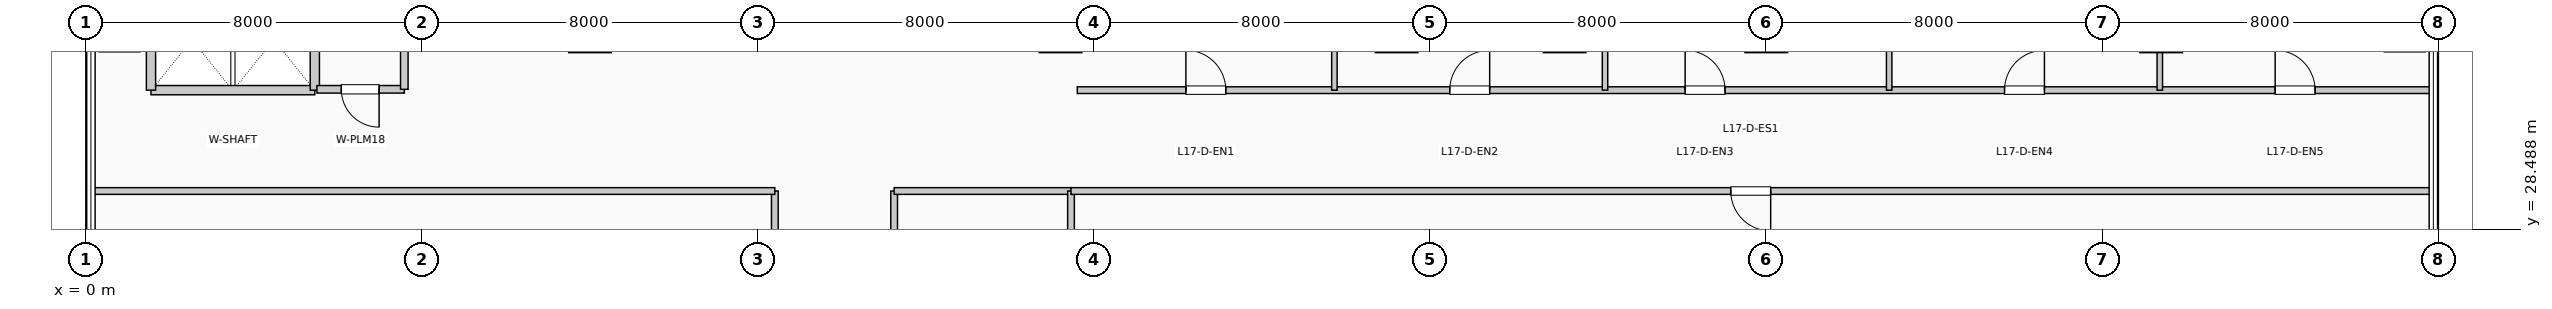
"""IFC4 building model, lengths in metres.
Left out: names, types, materials, properties, quantities, classifications, styles, units other than length and angle.
Written with IfcOpenShell. Run it as: python <this file> out.ifc"""

import sys

from ifc_helpers import new_model, si_unit, direction, frame, frame_2d, origin, place, context, subcontext, project, spatial, rectangle, extrude, element, fill, save


model = new_model("IFC4")
c1 = context("Model", 3, precision=1e-05, world=origin(), true_north=direction((0.0, 1.0)))
c2 = subcontext(c1, "Body", "Model", "MODEL_VIEW")
j1 = project(units=[si_unit("LENGTHUNIT", "METRE"), si_unit("PLANEANGLEUNIT", "RADIAN")], contexts=[c1])
p1 = place(None, origin())
s1 = spatial("IfcSite", under=j1, at=p1, CompositionType="ELEMENT")
p2 = place(p1, origin())
s2 = spatial("IfcBuilding", under=s1, at=p2, CompositionType="ELEMENT")
p3 = place(p2, frame((0.0, 0.0, 73.92)))
s3 = spatial("IfcBuildingStorey", under=s2, at=p3, CompositionType="ELEMENT", Elevation=73.92)
p4 = place(p3, frame((1.55, 31.8, 0.0), z_axis=(0.0, 0.0, 1.0), x_axis=(1.0, 0.0, 0.0)))
e1 = element("IfcWall", 1, at=p4, inside=s3, PredefinedType="PARTITIONING", context=c2, shape_type="SweptSolid", body=[
    extrude(rectangle(XDim=3.9, YDim=0.22, at=frame_2d((1.95, 0.0))), origin(), (0.0, 0.0, 1.0), 3.71),
])
for number, where, z_axis, x_axis in (
    (2, (1.55, 31.8, 0.0), (0.0, 0.0, 1.0), (0.0, 1.0, 0.0)),
    (3, (5.45, 31.8, 0.0), (0.0, 0.0, 1.0), (0.0, 1.0, 0.0)),
):
    element("IfcWall", number, at=place(p3, frame(where, z_axis=z_axis, x_axis=x_axis)), inside=s3, PredefinedType="PARTITIONING", context=c2, shape_type="SweptSolid", body=[
        extrude(rectangle(XDim=2.38, YDim=0.22, at=frame_2d((1.19, 0.0))), origin(), (0.0, 0.0, 1.0), 3.71),
    ])
p5 = place(p3, frame((5.5, 31.82, 0.0), z_axis=(0.0, 0.0, 1.0), x_axis=(1.0, 0.0, 0.0)))
e4 = element("IfcWall", 4, at=p5, inside=s3, PredefinedType="PLUMBINGWALL", context=c2, shape_type="SweptSolid", body=[
    extrude(rectangle(XDim=2.08, YDim=0.18, at=frame_2d((1.04, 0.0))), origin(), (0.0, 0.0, 1.0), 3.71),
])
p6 = place(p5, frame((1.48, 0.0, 0.0), z_axis=(0.0, 0.0, 1.0), x_axis=(-1.0, 0.0, 0.0)))
e5 = element("IfcOpeningElement", 5, at=p6, cuts=e4, PredefinedType="OPENING", context=c2, shape_type="SweptSolid", body=[
    extrude(rectangle(XDim=0.9, YDim=2.1, at=frame_2d((0.45, 1.05))), frame((0.0, 0.1, 0.0), z_axis=(0.0, -1.0, 0.0), x_axis=(1.0, 0.0, 0.0)), (0.0, 0.0, 1.0), 0.2),
])
p7 = place(p3, frame((7.58, 31.82, 0.0), z_axis=(0.0, 0.0, 1.0), x_axis=(0.0, 1.0, 0.0)))
e6 = element("IfcWall", 6, at=p7, inside=s3, PredefinedType="PLUMBINGWALL", context=c2, shape_type="SweptSolid", body=[
    extrude(rectangle(XDim=2.36, YDim=0.18, at=frame_2d((1.18, 0.0))), origin(), (0.0, 0.0, 1.0), 3.71),
])
p8 = place(p3, frame((16.4, 8.8, 0.0), z_axis=(0.0, 0.0, 1.0), x_axis=(0.0, 1.0, 0.0)))
e7 = element("IfcWall", 7, at=p8, inside=s3, PredefinedType="PARTITIONING", context=c2, shape_type="SweptSolid", body=[
    extrude(rectangle(XDim=20.6, YDim=0.16, at=frame_2d((10.3, 0.0))), origin(), (0.0, 0.0, 1.0), 3.71),
])
p9 = place(p8, frame((10.775, 0.0, 0.0), z_axis=(0.0, 0.0, 1.0), x_axis=(-1.0, 0.0, 0.0)))
e8 = element("IfcOpeningElement", 8, at=p9, cuts=e7, PredefinedType="OPENING", context=c2, shape_type="SweptSolid", body=[
    extrude(rectangle(XDim=0.95, YDim=2.15, at=frame_2d((0.475, 1.075))), frame((0.0, 0.09, 0.0), z_axis=(0.0, -1.0, 0.0), x_axis=(1.0, 0.0, 0.0)), (0.0, 0.0, 1.0), 0.18),
])
p10 = place(p3, frame((19.24, 8.8, 0.0), z_axis=(0.0, 0.0, 1.0), x_axis=(0.0, 1.0, 0.0)))
e9 = element("IfcWall", 9, at=p10, inside=s3, PredefinedType="PARTITIONING", context=c2, shape_type="SweptSolid", body=[
    extrude(rectangle(XDim=20.6, YDim=0.16, at=frame_2d((10.3, 0.0))), origin(), (0.0, 0.0, 1.0), 3.71),
])
p11 = place(p10, frame((4.675, 0.0, 0.0)))
e10 = element("IfcOpeningElement", 10, at=p11, cuts=e9, PredefinedType="OPENING", context=c2, shape_type="SweptSolid", body=[
    extrude(rectangle(XDim=0.95, YDim=2.15, at=frame_2d((0.475, 1.075))), frame((0.0, 0.09, 0.0), z_axis=(0.0, -1.0, 0.0), x_axis=(1.0, 0.0, 0.0)), (0.0, 0.0, 1.0), 0.18),
])
p12 = place(p10, frame((14.975, 0.0, 0.0)))
e11 = element("IfcOpeningElement", 11, at=p12, cuts=e9, PredefinedType="OPENING", context=c2, shape_type="SweptSolid", body=[
    extrude(rectangle(XDim=0.95, YDim=2.15, at=frame_2d((0.475, 1.075))), frame((0.0, 0.09, 0.0), z_axis=(0.0, -1.0, 0.0), x_axis=(1.0, 0.0, 0.0)), (0.0, 0.0, 1.0), 0.18),
])
p13 = place(p3, frame((0.19, 29.4, 0.0), z_axis=(0.0, 0.0, 1.0), x_axis=(1.0, 0.0, 0.0)))
e12 = element("IfcWall", 12, at=p13, inside=s3, PredefinedType="PARTITIONING", context=c2, shape_type="SweptSolid", body=[
    extrude(rectangle(XDim=16.21, YDim=0.16, at=frame_2d((8.105, 0.0))), origin(), (0.0, 0.0, 1.0), 3.365),
])
p14 = place(p3, frame((19.24, 29.4, 0.0), z_axis=(0.0, 0.0, 1.0), x_axis=(1.0, 0.0, 0.0)))
e13 = element("IfcWall", 13, at=p14, inside=s3, PredefinedType="PARTITIONING", context=c2, shape_type="SweptSolid", body=[
    extrude(rectangle(XDim=4.21, YDim=0.16, at=frame_2d((2.105, 0.0))), origin(), (0.0, 0.0, 1.0), 3.71),
])
p15 = place(p3, frame((23.45, 0.19, 0.0), z_axis=(0.0, 0.0, 1.0), x_axis=(0.0, 1.0, 0.0)))
e14 = element("IfcWall", 14, at=p15, inside=s3, PredefinedType="PARTITIONING", context=c2, shape_type="SweptSolid", body=[
    extrude(rectangle(XDim=29.21, YDim=0.16, at=frame_2d((14.605, 0.0))), origin(), (0.0, 0.0, 1.0), 2.995),
])
p16 = place(p3, frame((23.45, 29.4, 0.0), z_axis=(0.0, 0.0, 1.0), x_axis=(1.0, 0.0, 0.0)))
e15 = element("IfcWall", 15, at=p16, inside=s3, PredefinedType="PARTITIONING", context=c2, shape_type="SweptSolid", body=[
    extrude(rectangle(XDim=32.36, YDim=0.16, at=frame_2d((16.18, 0.0))), origin(), (0.0, 0.0, 1.0), 3.365),
])
p17 = place(p16, frame((16.655, 0.0, 0.0), z_axis=(0.0, 0.0, 1.0), x_axis=(-1.0, 0.0, 0.0)))
e16 = element("IfcOpeningElement", 16, at=p17, cuts=e15, PredefinedType="OPENING", context=c2, shape_type="SweptSolid", body=[
    extrude(rectangle(XDim=0.95, YDim=2.15, at=frame_2d((0.475, 1.075))), frame((0.0, 0.09, 0.0), z_axis=(0.0, -1.0, 0.0), x_axis=(1.0, 0.0, 0.0)), (0.0, 0.0, 1.0), 0.18),
])
p18 = place(p3, frame((23.6, 31.8, 0.0), z_axis=(0.0, 0.0, 1.0), x_axis=(1.0, 0.0, 0.0)))
e17 = element("IfcWall", 17, at=p18, inside=s3, PredefinedType="PARTITIONING", context=c2, shape_type="SweptSolid", body=[
    extrude(rectangle(XDim=32.21, YDim=0.16, at=frame_2d((16.105, 0.0))), origin(), (0.0, 0.0, 1.0), 3.71),
])
p19 = place(p18, frame((2.585, 0.0, 0.0)))
e18 = element("IfcOpeningElement", 18, at=p19, cuts=e17, PredefinedType="OPENING", context=c2, shape_type="SweptSolid", body=[
    extrude(rectangle(XDim=0.95, YDim=2.15, at=frame_2d((0.475, 1.075))), frame((0.0, 0.09, 0.0), z_axis=(0.0, -1.0, 0.0), x_axis=(1.0, 0.0, 0.0)), (0.0, 0.0, 1.0), 0.18),
])
p20 = place(p18, frame((8.866, 0.0, 0.0)))
e19 = element("IfcOpeningElement", 19, at=p20, cuts=e17, PredefinedType="OPENING", context=c2, shape_type="SweptSolid", body=[
    extrude(rectangle(XDim=0.95, YDim=2.15, at=frame_2d((0.475, 1.075))), frame((0.0, 0.09, 0.0), z_axis=(0.0, -1.0, 0.0), x_axis=(1.0, 0.0, 0.0)), (0.0, 0.0, 1.0), 0.18),
])
p21 = place(p18, frame((14.469, 0.0, 0.0)))
e20 = element("IfcOpeningElement", 20, at=p21, cuts=e17, PredefinedType="OPENING", context=c2, shape_type="SweptSolid", body=[
    extrude(rectangle(XDim=0.95, YDim=2.15, at=frame_2d((0.475, 1.075))), frame((0.0, 0.09, 0.0), z_axis=(0.0, -1.0, 0.0), x_axis=(1.0, 0.0, 0.0)), (0.0, 0.0, 1.0), 0.18),
])
p22 = place(p18, frame((22.072, 0.0, 0.0)))
e21 = element("IfcOpeningElement", 21, at=p22, cuts=e17, PredefinedType="OPENING", context=c2, shape_type="SweptSolid", body=[
    extrude(rectangle(XDim=0.95, YDim=2.15, at=frame_2d((0.475, 1.075))), frame((0.0, 0.09, 0.0), z_axis=(0.0, -1.0, 0.0), x_axis=(1.0, 0.0, 0.0)), (0.0, 0.0, 1.0), 0.18),
])
p23 = place(p18, frame((28.514, 0.0, 0.0)))
e22 = element("IfcOpeningElement", 22, at=p23, cuts=e17, PredefinedType="OPENING", context=c2, shape_type="SweptSolid", body=[
    extrude(rectangle(XDim=0.95, YDim=2.15, at=frame_2d((0.475, 1.075))), frame((0.0, 0.09, 0.0), z_axis=(0.0, -1.0, 0.0), x_axis=(1.0, 0.0, 0.0)), (0.0, 0.0, 1.0), 0.18),
])
for number, where, z_axis, x_axis in (
    (23, (29.72, 31.8, 0.0), (0.0, 0.0, 1.0), (0.0, 1.0, 0.0)),
    (24, (36.162, 31.8, 0.0), (0.0, 0.0, 1.0), (0.0, 1.0, 0.0)),
    (25, (42.926, 31.8, 0.0), (0.0, 0.0, 1.0), (0.0, 1.0, 0.0)),
):
    element("IfcWall", number, at=place(p3, frame(where, z_axis=z_axis, x_axis=x_axis)), inside=s3, PredefinedType="PARTITIONING", context=c2, shape_type="SweptSolid", body=[
        extrude(rectangle(XDim=14.01, YDim=0.13, at=frame_2d((7.005, 0.0))), origin(), (0.0, 0.0, 1.0), 3.71),
    ])
p24 = place(p3, frame((49.368, 31.8, 0.0), z_axis=(0.0, 0.0, 1.0), x_axis=(0.0, 1.0, 0.0)))
e26 = element("IfcWall", 26, at=p24, inside=s3, PredefinedType="PARTITIONING", context=c2, shape_type="SweptSolid", body=[
    extrude(rectangle(XDim=14.01, YDim=0.13, at=frame_2d((7.005, 0.0))), origin(), (0.0, 0.0, 1.0), 2.995),
])
p25 = place(p6, origin())
e27 = element("IfcDoor", 27, at=p25, inside=s3, OperationType="SINGLE_SWING_RIGHT", PredefinedType="DOOR", context=c2, shape_type="SweptSolid", body=[
    extrude(rectangle(XDim=0.9, YDim=2.1, at=frame_2d((0.45, 1.05))), frame((0.0, 0.025, 0.0), z_axis=(0.0, -1.0, 0.0), x_axis=(1.0, 0.0, 0.0)), (0.0, 0.0, 1.0), 0.05),
])
fill(e5, e27)
p26 = place(p17, origin())
e28 = element("IfcDoor", 28, at=p26, inside=s3, OperationType="SINGLE_SWING_RIGHT", PredefinedType="DOOR", context=c2, shape_type="SweptSolid", body=[
    extrude(rectangle(XDim=0.95, YDim=2.15, at=frame_2d((0.475, 1.075))), frame((0.0, 0.025, 0.0), z_axis=(0.0, -1.0, 0.0), x_axis=(1.0, 0.0, 0.0)), (0.0, 0.0, 1.0), 0.05),
])
fill(e16, e28)
p27 = place(p19, origin())
e29 = element("IfcDoor", 29, at=p27, inside=s3, OperationType="SINGLE_SWING_LEFT", PredefinedType="DOOR", context=c2, shape_type="SweptSolid", body=[
    extrude(rectangle(XDim=0.95, YDim=2.15, at=frame_2d((0.475, 1.075))), frame((0.0, 0.025, 0.0), z_axis=(0.0, -1.0, 0.0), x_axis=(1.0, 0.0, 0.0)), (0.0, 0.0, 1.0), 0.05),
])
fill(e18, e29)
p28 = place(p20, origin())
e30 = element("IfcDoor", 30, at=p28, inside=s3, OperationType="SINGLE_SWING_RIGHT", PredefinedType="DOOR", context=c2, shape_type="SweptSolid", body=[
    extrude(rectangle(XDim=0.95, YDim=2.15, at=frame_2d((0.475, 1.075))), frame((0.0, 0.025, 0.0), z_axis=(0.0, -1.0, 0.0), x_axis=(1.0, 0.0, 0.0)), (0.0, 0.0, 1.0), 0.05),
])
fill(e19, e30)
p29 = place(p21, origin())
e31 = element("IfcDoor", 31, at=p29, inside=s3, OperationType="SINGLE_SWING_LEFT", PredefinedType="DOOR", context=c2, shape_type="SweptSolid", body=[
    extrude(rectangle(XDim=0.95, YDim=2.15, at=frame_2d((0.475, 1.075))), frame((0.0, 0.025, 0.0), z_axis=(0.0, -1.0, 0.0), x_axis=(1.0, 0.0, 0.0)), (0.0, 0.0, 1.0), 0.05),
])
fill(e20, e31)
p30 = place(p22, origin())
e32 = element("IfcDoor", 32, at=p30, inside=s3, OperationType="SINGLE_SWING_RIGHT", PredefinedType="DOOR", context=c2, shape_type="SweptSolid", body=[
    extrude(rectangle(XDim=0.95, YDim=2.15, at=frame_2d((0.475, 1.075))), frame((0.0, 0.025, 0.0), z_axis=(0.0, -1.0, 0.0), x_axis=(1.0, 0.0, 0.0)), (0.0, 0.0, 1.0), 0.05),
])
fill(e21, e32)
p31 = place(p23, origin())
e33 = element("IfcDoor", 33, at=p31, inside=s3, OperationType="SINGLE_SWING_LEFT", PredefinedType="DOOR", context=c2, shape_type="SweptSolid", body=[
    extrude(rectangle(XDim=0.95, YDim=2.15, at=frame_2d((0.475, 1.075))), frame((0.0, 0.025, 0.0), z_axis=(0.0, -1.0, 0.0), x_axis=(1.0, 0.0, 0.0)), (0.0, 0.0, 1.0), 0.05),
])
fill(e22, e33)
save(model, sys.argv[1])
